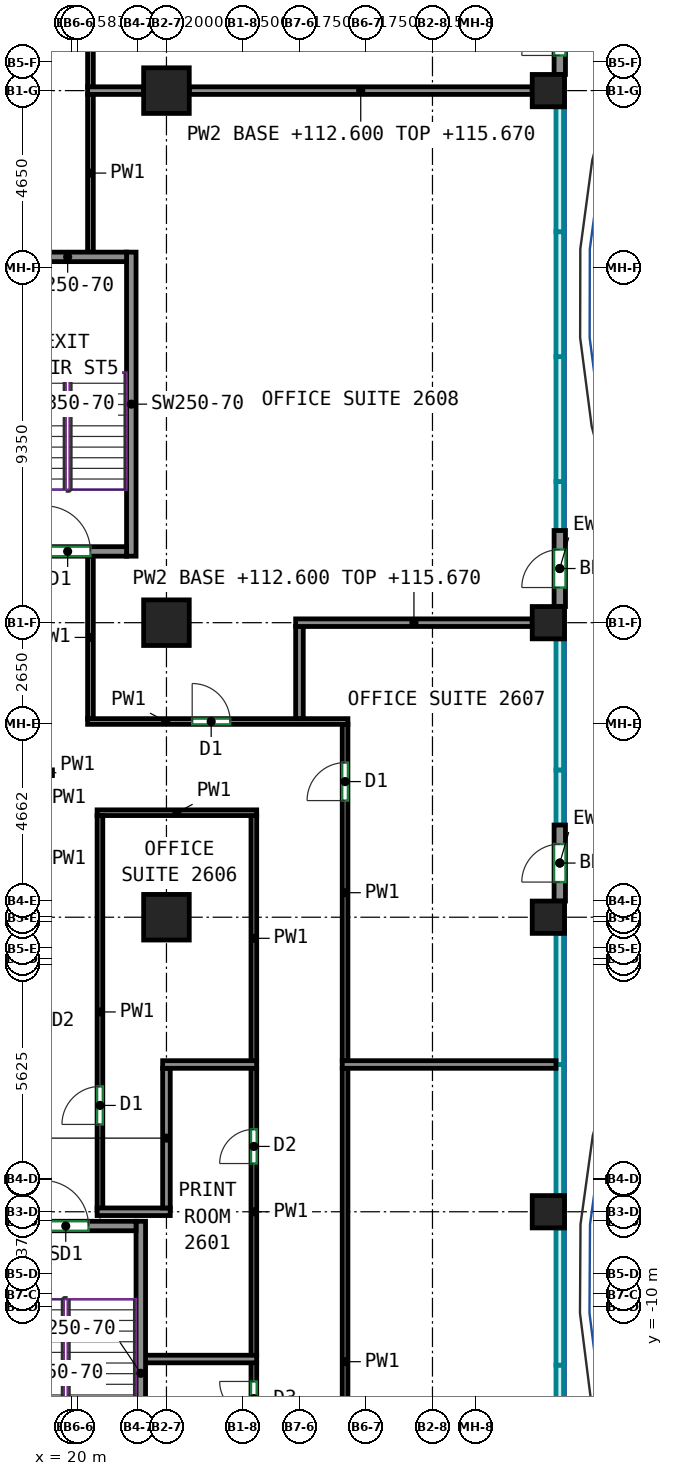
"""IFC4 building model, lengths in metres.
Left out: names, types, materials, properties, quantities, classifications, styles, units other than length and angle.
Written with IfcOpenShell. Run it as: python <this file> out.ifc"""

import sys

from ifc_helpers import new_model, si_unit, direction, frame, frame_2d, origin, origin_2d, place, context, subcontext, project, spatial, rectangle, extrude, source, transform, mapped, element, fill, save


model = new_model("IFC4")
c1 = context("Model", 3, precision=1e-05, world=origin(), true_north=direction((0.0, 1.0)))
c2 = subcontext(c1, "Body", "Model", "MODEL_VIEW")
j1 = project(units=[si_unit("LENGTHUNIT", "METRE"), si_unit("PLANEANGLEUNIT", "RADIAN")], contexts=[c1])
p1 = place(None, origin())
s1 = spatial("IfcSite", under=j1, at=p1, CompositionType="ELEMENT")
p2 = place(p1, origin())
s2 = spatial("IfcBuilding", under=s1, at=p2, CompositionType="ELEMENT")
p3 = place(p2, frame((0.0, 0.0, 112.6)))
s3 = spatial("IfcBuildingStorey", under=s2, at=p3, CompositionType="ELEMENT", Elevation=112.6)
m1 = source(origin(), c2, "Body", "SweptSolid", [
    extrude(rectangle(XDim=1.2, YDim=1.2, at=origin_2d()), origin(), (0.0, 0.0, 1.0), 3.72),
])
for number, where, z_axis, x_axis in (
    (1, (22.5, 0.25, 0.0), (0.0, 0.0, 1.0), (1.0, 0.0, 0.0)),
    (2, (22.5, 8.0, 0.0), (0.0, 0.0, 1.0), (1.0, 0.0, 0.0)),
    (3, (22.5, 22.0, 0.0), (0.0, 0.0, 1.0), (1.0, 0.0, 0.0)),
):
    element("IfcColumn", number, at=place(p3, frame(where, z_axis=z_axis, x_axis=x_axis)), inside=s3, PredefinedType="COLUMN", context=c2, shape_type="MappedRepresentation", body=[
        mapped(m1, transform((0.0, 0.0, 0.0))),
    ])
m2 = source(origin(), c2, "Body", "SweptSolid", [
    extrude(rectangle(XDim=0.85, YDim=0.85, at=origin_2d()), origin(), (0.0, 0.0, 1.0), 3.72),
])
for number, where, z_axis, x_axis in (
    (4, (32.55, -7.5, 0.0), (0.0, 0.0, 1.0), (1.0, 0.0, 0.0)),
    (5, (32.55, 0.25, 0.0), (0.0, 0.0, 1.0), (1.0, 0.0, 0.0)),
    (6, (32.55, 8.0, 0.0), (0.0, 0.0, 1.0), (1.0, 0.0, 0.0)),
    (7, (32.55, 22.0, 0.0), (0.0, 0.0, 1.0), (1.0, 0.0, 0.0)),
):
    element("IfcColumn", number, at=place(p3, frame(where, z_axis=z_axis, x_axis=x_axis)), inside=s3, PredefinedType="COLUMN", context=c2, shape_type="MappedRepresentation", body=[
        mapped(m2, transform((0.0, 0.0, 0.0))),
    ])
m3 = source(origin(), c2, "Body", "SweptSolid", [
    extrude(rectangle(XDim=8.0, YDim=0.25, at=frame_2d((4.0, 0.0))), origin(), (0.0, 0.0, 1.0), 3.72),
])
p4 = place(p3, frame((21.825, -15.75, 0.0), z_axis=(0.0, 0.0, 1.0), x_axis=(0.0, 1.0, 0.0)))
e8 = element("IfcWall", 8, at=p4, inside=s3, PredefinedType="SHEAR", context=c2, shape_type="MappedRepresentation", body=[
    mapped(m3, transform((0.0, 0.0, 0.0))),
])
m4 = source(origin(), c2, "Body", "SweptSolid", [
    extrude(rectangle(XDim=3.7, YDim=0.25, at=frame_2d((1.85, 0.0))), origin(), (0.0, 0.0, 1.0), 3.72),
])
p5 = place(p3, frame((18.0, -7.875, 0.0), z_axis=(0.0, 0.0, 1.0), x_axis=(1.0, 0.0, 0.0)))
e9 = element("IfcWall", 9, at=p5, inside=s3, PredefinedType="SHEAR", context=c2, shape_type="MappedRepresentation", body=[
    mapped(m4, transform((0.0, 0.0, 0.0))),
])
p6 = place(p5, frame((1.25, 0.0, 0.0)))
e10 = element("IfcOpeningElement", 10, at=p6, cuts=e9, PredefinedType="OPENING", context=c2, shape_type="SweptSolid", body=[
    extrude(rectangle(XDim=1.2, YDim=2.1, at=frame_2d((0.6, 1.05))), frame((0.0, 0.135, 0.0), z_axis=(0.0, -1.0, 0.0), x_axis=(1.0, 0.0, 0.0)), (0.0, 0.0, 1.0), 0.27),
])
p7 = place(p3, frame((21.575, 9.75, 0.0), z_axis=(0.0, 0.0, 1.0), x_axis=(0.0, 1.0, 0.0)))
e11 = element("IfcWall", 11, at=p7, inside=s3, PredefinedType="SHEAR", context=c2, shape_type="MappedRepresentation", body=[
    mapped(m3, transform((0.0, 0.0, 0.0))),
])
m5 = source(origin(), c2, "Body", "SweptSolid", [
    extrude(rectangle(XDim=3.1, YDim=0.25, at=frame_2d((1.55, 0.0))), origin(), (0.0, 0.0, 1.0), 3.72),
])
p8 = place(p3, frame((18.35, 9.875, 0.0), z_axis=(0.0, 0.0, 1.0), x_axis=(1.0, 0.0, 0.0)))
e12 = element("IfcWall", 12, at=p8, inside=s3, PredefinedType="SHEAR", context=c2, shape_type="MappedRepresentation", body=[
    mapped(m5, transform((0.0, 0.0, 0.0))),
])
p9 = place(p8, frame((0.95, 0.0, 0.0)))
e13 = element("IfcOpeningElement", 13, at=p9, cuts=e12, PredefinedType="OPENING", context=c2, shape_type="SweptSolid", body=[
    extrude(rectangle(XDim=1.2, YDim=2.1, at=frame_2d((0.6, 1.05))), frame((0.0, 0.135, 0.0), z_axis=(0.0, -1.0, 0.0), x_axis=(1.0, 0.0, 0.0)), (0.0, 0.0, 1.0), 0.27),
])
p10 = place(p3, frame((18.35, 17.625, 0.0), z_axis=(0.0, 0.0, 1.0), x_axis=(1.0, 0.0, 0.0)))
e14 = element("IfcWall", 14, at=p10, inside=s3, PredefinedType="SHEAR", context=c2, shape_type="MappedRepresentation", body=[
    mapped(m5, transform((0.0, 0.0, 0.0))),
])
m6 = source(origin(), c2, "Body", "SweptSolid", [
    extrude(rectangle(XDim=2.0, YDim=0.3, at=frame_2d((1.0, 0.0))), origin(), (0.0, 0.0, 1.0), 3.72),
])
p11 = place(p3, frame((32.85, 0.675, 0.0), z_axis=(0.0, 0.0, 1.0), x_axis=(0.0, 1.0, 0.0)))
e15 = element("IfcWall", 15, at=p11, inside=s3, PredefinedType="SOLIDWALL", context=c2, shape_type="MappedRepresentation", body=[
    mapped(m6, transform((0.0, 0.0, 0.0))),
])
p12 = place(p11, frame((0.5, 0.0, 0.0)))
e16 = element("IfcOpeningElement", 16, at=p12, cuts=e15, PredefinedType="OPENING", context=c2, shape_type="SweptSolid", body=[
    extrude(rectangle(XDim=1.0, YDim=2.1, at=frame_2d((0.5, 1.05))), frame((0.0, 0.16, 0.0), z_axis=(0.0, -1.0, 0.0), x_axis=(1.0, 0.0, 0.0)), (0.0, 0.0, 1.0), 0.32),
])
p13 = place(p3, frame((32.85, 8.425, 0.0), z_axis=(0.0, 0.0, 1.0), x_axis=(0.0, 1.0, 0.0)))
e17 = element("IfcWall", 17, at=p13, inside=s3, PredefinedType="SOLIDWALL", context=c2, shape_type="MappedRepresentation", body=[
    mapped(m6, transform((0.0, 0.0, 0.0))),
])
p14 = place(p13, frame((0.5, 0.0, 0.0)))
e18 = element("IfcOpeningElement", 18, at=p14, cuts=e17, PredefinedType="OPENING", context=c2, shape_type="SweptSolid", body=[
    extrude(rectangle(XDim=1.0, YDim=2.1, at=frame_2d((0.5, 1.05))), frame((0.0, 0.16, 0.0), z_axis=(0.0, -1.0, 0.0), x_axis=(1.0, 0.0, 0.0)), (0.0, 0.0, 1.0), 0.32),
])
p15 = place(p3, frame((32.85, 22.425, 0.0), z_axis=(0.0, 0.0, 1.0), x_axis=(0.0, 1.0, 0.0)))
e19 = element("IfcWall", 19, at=p15, inside=s3, PredefinedType="SOLIDWALL", context=c2, shape_type="MappedRepresentation", body=[
    mapped(m6, transform((0.0, 0.0, 0.0))),
])
p16 = place(p15, frame((0.5, 0.0, 0.0)))
e20 = element("IfcOpeningElement", 20, at=p16, cuts=e19, PredefinedType="OPENING", context=c2, shape_type="SweptSolid", body=[
    extrude(rectangle(XDim=1.0, YDim=2.1, at=frame_2d((0.5, 1.05))), frame((0.0, 0.16, 0.0), z_axis=(0.0, -1.0, 0.0), x_axis=(1.0, 0.0, 0.0)), (0.0, 0.0, 1.0), 0.32),
])
p17 = place(p3, frame((24.8, -19.175, 0.0), z_axis=(0.0, 0.0, 1.0), x_axis=(0.0, 1.0, 0.0)))
e21 = element("IfcWall", 21, at=p17, inside=s3, PredefinedType="PARTITIONING", context=c2, shape_type="SweptSolid", body=[
    extrude(rectangle(XDim=7.71, YDim=0.15, at=frame_2d((3.855, 0.0))), origin(), (0.0, 0.0, 1.0), 3.72),
])
p18 = place(p17, frame((6.31, 0.0, 0.0)))
e22 = element("IfcOpeningElement", 22, at=p18, cuts=e21, PredefinedType="OPENING", context=c2, shape_type="SweptSolid", body=[
    extrude(rectangle(XDim=0.9, YDim=2.1, at=frame_2d((0.45, 1.05))), frame((0.0, 0.085, 0.0), z_axis=(0.0, -1.0, 0.0), x_axis=(1.0, 0.0, 0.0)), (0.0, 0.0, 1.0), 0.17),
])
p19 = place(p3, frame((27.2, -19.175, 0.0), z_axis=(0.0, 0.0, 1.0), x_axis=(0.0, 1.0, 0.0)))
e23 = element("IfcWall", 23, at=p19, inside=s3, PredefinedType="PARTITIONING", context=c2, shape_type="SweptSolid", body=[
    extrude(rectangle(XDim=15.46, YDim=0.15, at=frame_2d((7.73, 0.0))), origin(), (0.0, 0.0, 1.0), 3.72),
])
p20 = place(p19, frame((3.514, 0.0, 0.0)))
e24 = element("IfcOpeningElement", 24, at=p20, cuts=e23, PredefinedType="OPENING", context=c2, shape_type="SweptSolid", body=[
    extrude(rectangle(XDim=1.0, YDim=2.1, at=frame_2d((0.5, 1.05))), frame((0.0, 0.085, 0.0), z_axis=(0.0, -1.0, 0.0), x_axis=(1.0, 0.0, 0.0)), (0.0, 0.0, 1.0), 0.17),
])
p21 = place(p3, frame((24.8, -11.285, 0.0), z_axis=(0.0, 0.0, 1.0), x_axis=(0.0, 1.0, 0.0)))
e25 = element("IfcWall", 25, at=p21, inside=s3, PredefinedType="PARTITIONING", context=c2, shape_type="SweptSolid", body=[
    extrude(rectangle(XDim=7.57, YDim=0.15, at=frame_2d((3.785, 0.0))), origin(), (0.0, 0.0, 1.0), 3.72),
])
p22 = place(p21, frame((5.054, 0.0, 0.0)))
e26 = element("IfcOpeningElement", 26, at=p22, cuts=e25, PredefinedType="OPENING", context=c2, shape_type="SweptSolid", body=[
    extrude(rectangle(XDim=0.9, YDim=2.1, at=frame_2d((0.45, 1.05))), frame((0.0, 0.085, 0.0), z_axis=(0.0, -1.0, 0.0), x_axis=(1.0, 0.0, 0.0)), (0.0, 0.0, 1.0), 0.17),
])
p23 = place(p3, frame((24.8, -3.535, 0.0), z_axis=(0.0, 0.0, 1.0), x_axis=(0.0, 1.0, 0.0)))
e27 = element("IfcWall", 27, at=p23, inside=s3, PredefinedType="PARTITIONING", context=c2, shape_type="SweptSolid", body=[
    extrude(rectangle(XDim=6.46, YDim=0.15, at=frame_2d((3.23, 0.0))), origin(), (0.0, 0.0, 1.0), 3.72),
])
p24 = place(p3, frame((20.675, 3.0, 0.0), z_axis=(0.0, 0.0, 1.0), x_axis=(1.0, 0.0, 0.0)))
e28 = element("IfcWall", 28, at=p24, inside=s3, PredefinedType="PARTITIONING", context=c2, shape_type="SweptSolid", body=[
    extrude(rectangle(XDim=4.2, YDim=0.15, at=frame_2d((2.1, 0.0))), origin(), (0.0, 0.0, 1.0), 3.72),
])
p25 = place(p3, frame((20.75, -7.41, 0.0), z_axis=(0.0, 0.0, 1.0), x_axis=(0.0, 1.0, 0.0)))
e29 = element("IfcWall", 29, at=p25, inside=s3, PredefinedType="PARTITIONING", context=c2, shape_type="SweptSolid", body=[
    extrude(rectangle(XDim=10.335, YDim=0.15, at=frame_2d((5.167, 0.0))), origin(), (0.0, 0.0, 1.0), 3.72),
])
p26 = place(p25, frame((2.208, 0.0, 0.0)))
e30 = element("IfcOpeningElement", 30, at=p26, cuts=e29, PredefinedType="OPENING", context=c2, shape_type="SweptSolid", body=[
    extrude(rectangle(XDim=1.0, YDim=2.1, at=frame_2d((0.5, 1.05))), frame((0.0, 0.085, 0.0), z_axis=(0.0, -1.0, 0.0), x_axis=(1.0, 0.0, 0.0)), (0.0, 0.0, 1.0), 0.17),
])
p27 = place(p3, frame((27.2, -3.535, 0.0), z_axis=(0.0, 0.0, 1.0), x_axis=(0.0, 1.0, 0.0)))
e31 = element("IfcWall", 31, at=p27, inside=s3, PredefinedType="PARTITIONING", context=c2, shape_type="SweptSolid", body=[
    extrude(rectangle(XDim=8.86, YDim=0.15, at=frame_2d((4.43, 0.0))), origin(), (0.0, 0.0, 1.0), 3.72),
])
p28 = place(p27, frame((6.854, 0.0, 0.0)))
e32 = element("IfcOpeningElement", 32, at=p28, cuts=e31, PredefinedType="OPENING", context=c2, shape_type="SweptSolid", body=[
    extrude(rectangle(XDim=1.0, YDim=2.1, at=frame_2d((0.5, 1.05))), frame((0.0, 0.085, 0.0), z_axis=(0.0, -1.0, 0.0), x_axis=(1.0, 0.0, 0.0)), (0.0, 0.0, 1.0), 0.17),
])
p29 = place(p3, frame((20.5, 17.75, 0.0), z_axis=(0.0, 0.0, 1.0), x_axis=(0.0, 1.0, 0.0)))
e33 = element("IfcWall", 33, at=p29, inside=s3, PredefinedType="PARTITIONING", context=c2, shape_type="SweptSolid", body=[
    extrude(rectangle(XDim=4.16, YDim=0.15, at=frame_2d((2.08, 0.0))), origin(), (0.0, 0.0, 1.0), 3.72),
])
p30 = place(p3, frame((20.5, 5.475, 0.0), z_axis=(0.0, 0.0, 1.0), x_axis=(0.0, 1.0, 0.0)))
e34 = element("IfcWall", 34, at=p30, inside=s3, PredefinedType="PARTITIONING", context=c2, shape_type="SweptSolid", body=[
    extrude(rectangle(XDim=4.275, YDim=0.15, at=frame_2d((2.137, 0.0))), origin(), (0.0, 0.0, 1.0), 3.72),
])
p31 = place(p3, frame((20.425, 5.4, 0.0), z_axis=(0.0, 0.0, 1.0), x_axis=(1.0, 0.0, 0.0)))
e35 = element("IfcWall", 35, at=p31, inside=s3, PredefinedType="PARTITIONING", context=c2, shape_type="SweptSolid", body=[
    extrude(rectangle(XDim=6.85, YDim=0.15, at=frame_2d((3.425, 0.0))), origin(), (0.0, 0.0, 1.0), 3.72),
])
p32 = place(p31, frame((2.752, 0.0, 0.0)))
e36 = element("IfcOpeningElement", 36, at=p32, cuts=e35, PredefinedType="OPENING", context=c2, shape_type="SweptSolid", body=[
    extrude(rectangle(XDim=1.0, YDim=2.1, at=frame_2d((0.5, 1.05))), frame((0.0, 0.085, 0.0), z_axis=(0.0, -1.0, 0.0), x_axis=(1.0, 0.0, 0.0)), (0.0, 0.0, 1.0), 0.17),
])
p33 = place(p3, frame((20.5, 22.09, 0.0), z_axis=(0.0, 0.0, 1.0), x_axis=(0.0, 1.0, 0.0)))
e37 = element("IfcWall", 37, at=p33, inside=s3, PredefinedType="PARTITIONING", context=c2, shape_type="SweptSolid", body=[
    extrude(rectangle(XDim=3.035, YDim=0.15, at=frame_2d((1.518, 0.0))), origin(), (0.0, 0.0, 1.0), 3.72),
])
p34 = place(p3, frame((21.95, -11.375, 0.0), z_axis=(0.0, 0.0, 1.0), x_axis=(1.0, 0.0, 0.0)))
e38 = element("IfcWall", 38, at=p34, inside=s3, PredefinedType="PARTITIONING", context=c2, shape_type="SweptSolid", body=[
    extrude(rectangle(XDim=2.924, YDim=0.2, at=frame_2d((1.462, 0.0))), origin(), (0.0, 0.0, 1.0), 3.72),
])
p35 = place(p3, frame((27.126, -3.625, 0.0), z_axis=(0.0, 0.0, 1.0), x_axis=(1.0, 0.0, 0.0)))
e39 = element("IfcWall", 39, at=p35, inside=s3, PredefinedType="PARTITIONING", context=c2, shape_type="SweptSolid", body=[
    extrude(rectangle(XDim=5.624, YDim=0.2, at=frame_2d((2.812, 0.0))), origin(), (0.0, 0.0, 1.0), 3.72),
])
p36 = place(p3, frame((22.6, -7.5, 0.0), z_axis=(0.0, 0.0, 1.0), x_axis=(-1.0, 0.0, 0.0)))
e40 = element("IfcWall", 40, at=p36, inside=s3, PredefinedType="PARTITIONING", context=c2, shape_type="SweptSolid", body=[
    extrude(rectangle(XDim=1.924, YDim=0.2, at=frame_2d((0.962, 0.0))), origin(), (0.0, 0.0, 1.0), 3.72),
])
p37 = place(p3, frame((22.5, -3.725, 0.0), z_axis=(0.0, 0.0, 1.0), x_axis=(0.0, -1.0, 0.0)))
e41 = element("IfcWall", 41, at=p37, inside=s3, PredefinedType="PARTITIONING", context=c2, shape_type="SweptSolid", body=[
    extrude(rectangle(XDim=3.675, YDim=0.2, at=frame_2d((1.837, 0.0))), origin(), (0.0, 0.0, 1.0), 3.07),
])
p38 = place(p3, frame((22.4, -3.625, 0.0), z_axis=(0.0, 0.0, 1.0), x_axis=(1.0, 0.0, 0.0)))
e42 = element("IfcWall", 42, at=p38, inside=s3, PredefinedType="PARTITIONING", context=c2, shape_type="SweptSolid", body=[
    extrude(rectangle(XDim=2.474, YDim=0.2, at=frame_2d((1.237, 0.0))), origin(), (0.0, 0.0, 1.0), 3.72),
])
p39 = place(p3, frame((26.0, 5.476, 0.0), z_axis=(0.0, 0.0, 1.0), x_axis=(0.0, 1.0, 0.0)))
e43 = element("IfcWall", 43, at=p39, inside=s3, PredefinedType="PARTITIONING", context=c2, shape_type="SweptSolid", body=[
    extrude(rectangle(XDim=2.424, YDim=0.2, at=frame_2d((1.212, 0.0))), origin(), (0.0, 0.0, 1.0), 3.72),
])
p40 = place(p3, frame((25.9, 8.0, 0.0), z_axis=(0.0, 0.0, 1.0), x_axis=(1.0, 0.0, 0.0)))
e44 = element("IfcWall", 44, at=p40, inside=s3, PredefinedType="PARTITIONING", context=c2, shape_type="SweptSolid", body=[
    extrude(rectangle(XDim=6.225, YDim=0.2, at=frame_2d((3.113, 0.0))), origin(), (0.0, 0.0, 1.0), 3.07),
])
p41 = place(p3, frame((20.426, 22.0, 0.0), z_axis=(0.0, 0.0, 1.0), x_axis=(1.0, 0.0, 0.0)))
e45 = element("IfcWall", 45, at=p41, inside=s3, PredefinedType="PARTITIONING", context=c2, shape_type="SweptSolid", body=[
    extrude(rectangle(XDim=1.474, YDim=0.2, at=frame_2d((0.737, 0.0))), origin(), (0.0, 0.0, 1.0), 3.72),
])
p42 = place(p3, frame((23.1, 22.0, 0.0), z_axis=(0.0, 0.0, 1.0), x_axis=(1.0, 0.0, 0.0)))
e46 = element("IfcWall", 46, at=p42, inside=s3, PredefinedType="PARTITIONING", context=c2, shape_type="SweptSolid", body=[
    extrude(rectangle(XDim=9.025, YDim=0.2, at=frame_2d((4.512, 0.0))), origin(), (0.0, 0.0, 1.0), 3.07),
])
p43 = place(p12, origin())
e47 = element("IfcDoor", 47, at=p43, inside=s3, OperationType="SINGLE_SWING_LEFT", PredefinedType="DOOR", context=c2, shape_type="SweptSolid", body=[
    extrude(rectangle(XDim=1.0, YDim=2.1, at=frame_2d((0.5, 1.05))), frame((0.0, 0.025, 0.0), z_axis=(0.0, -1.0, 0.0), x_axis=(1.0, 0.0, 0.0)), (0.0, 0.0, 1.0), 0.05),
])
fill(e16, e47)
p44 = place(p14, origin())
e48 = element("IfcDoor", 48, at=p44, inside=s3, OperationType="SINGLE_SWING_LEFT", PredefinedType="DOOR", context=c2, shape_type="SweptSolid", body=[
    extrude(rectangle(XDim=1.0, YDim=2.1, at=frame_2d((0.5, 1.05))), frame((0.0, 0.025, 0.0), z_axis=(0.0, -1.0, 0.0), x_axis=(1.0, 0.0, 0.0)), (0.0, 0.0, 1.0), 0.05),
])
fill(e18, e48)
p45 = place(p16, origin())
e49 = element("IfcDoor", 49, at=p45, inside=s3, OperationType="SINGLE_SWING_LEFT", PredefinedType="DOOR", context=c2, shape_type="SweptSolid", body=[
    extrude(rectangle(XDim=1.0, YDim=2.1, at=frame_2d((0.5, 1.05))), frame((0.0, 0.025, 0.0), z_axis=(0.0, -1.0, 0.0), x_axis=(1.0, 0.0, 0.0)), (0.0, 0.0, 1.0), 0.05),
])
fill(e20, e49)
p46 = place(p6, origin())
e50 = element("IfcDoor", 50, at=p46, inside=s3, OperationType="DOUBLE_DOOR_SINGLE_SWING", PredefinedType="DOOR", context=c2, shape_type="SweptSolid", body=[
    extrude(rectangle(XDim=1.2, YDim=2.1, at=frame_2d((0.6, 1.05))), frame((0.0, 0.025, 0.0), z_axis=(0.0, -1.0, 0.0), x_axis=(1.0, 0.0, 0.0)), (0.0, 0.0, 1.0), 0.05),
])
fill(e10, e50)
p47 = place(p9, origin())
e51 = element("IfcDoor", 51, at=p47, inside=s3, OperationType="DOUBLE_DOOR_SINGLE_SWING", PredefinedType="DOOR", context=c2, shape_type="SweptSolid", body=[
    extrude(rectangle(XDim=1.2, YDim=2.1, at=frame_2d((0.6, 1.05))), frame((0.0, 0.025, 0.0), z_axis=(0.0, -1.0, 0.0), x_axis=(1.0, 0.0, 0.0)), (0.0, 0.0, 1.0), 0.05),
])
fill(e13, e51)
p48 = place(p18, origin())
e52 = element("IfcDoor", 52, at=p48, inside=s3, OperationType="SINGLE_SWING_RIGHT", PredefinedType="DOOR", context=c2, shape_type="SweptSolid", body=[
    extrude(rectangle(XDim=0.9, YDim=2.1, at=frame_2d((0.45, 1.05))), frame((0.0, 0.025, 0.0), z_axis=(0.0, -1.0, 0.0), x_axis=(1.0, 0.0, 0.0)), (0.0, 0.0, 1.0), 0.05),
])
fill(e22, e52)
p49 = place(p22, origin())
e53 = element("IfcDoor", 53, at=p49, inside=s3, OperationType="SINGLE_SWING_LEFT", PredefinedType="DOOR", context=c2, shape_type="SweptSolid", body=[
    extrude(rectangle(XDim=0.9, YDim=2.1, at=frame_2d((0.45, 1.05))), frame((0.0, 0.025, 0.0), z_axis=(0.0, -1.0, 0.0), x_axis=(1.0, 0.0, 0.0)), (0.0, 0.0, 1.0), 0.05),
])
fill(e26, e53)
p50 = place(p26, origin())
e54 = element("IfcDoor", 54, at=p50, inside=s3, OperationType="SINGLE_SWING_LEFT", PredefinedType="DOOR", context=c2, shape_type="SweptSolid", body=[
    extrude(rectangle(XDim=1.0, YDim=2.1, at=frame_2d((0.5, 1.05))), frame((0.0, 0.025, 0.0), z_axis=(0.0, -1.0, 0.0), x_axis=(1.0, 0.0, 0.0)), (0.0, 0.0, 1.0), 0.05),
])
fill(e30, e54)
p51 = place(p28, origin())
e55 = element("IfcDoor", 55, at=p51, inside=s3, OperationType="SINGLE_SWING_LEFT", PredefinedType="DOOR", context=c2, shape_type="SweptSolid", body=[
    extrude(rectangle(XDim=1.0, YDim=2.1, at=frame_2d((0.5, 1.05))), frame((0.0, 0.025, 0.0), z_axis=(0.0, -1.0, 0.0), x_axis=(1.0, 0.0, 0.0)), (0.0, 0.0, 1.0), 0.05),
])
fill(e32, e55)
p52 = place(p32, origin())
e56 = element("IfcDoor", 56, at=p52, inside=s3, OperationType="SINGLE_SWING_LEFT", PredefinedType="DOOR", context=c2, shape_type="SweptSolid", body=[
    extrude(rectangle(XDim=1.0, YDim=2.1, at=frame_2d((0.5, 1.05))), frame((0.0, 0.025, 0.0), z_axis=(0.0, -1.0, 0.0), x_axis=(1.0, 0.0, 0.0)), (0.0, 0.0, 1.0), 0.05),
])
fill(e36, e56)
save(model, sys.argv[1])
